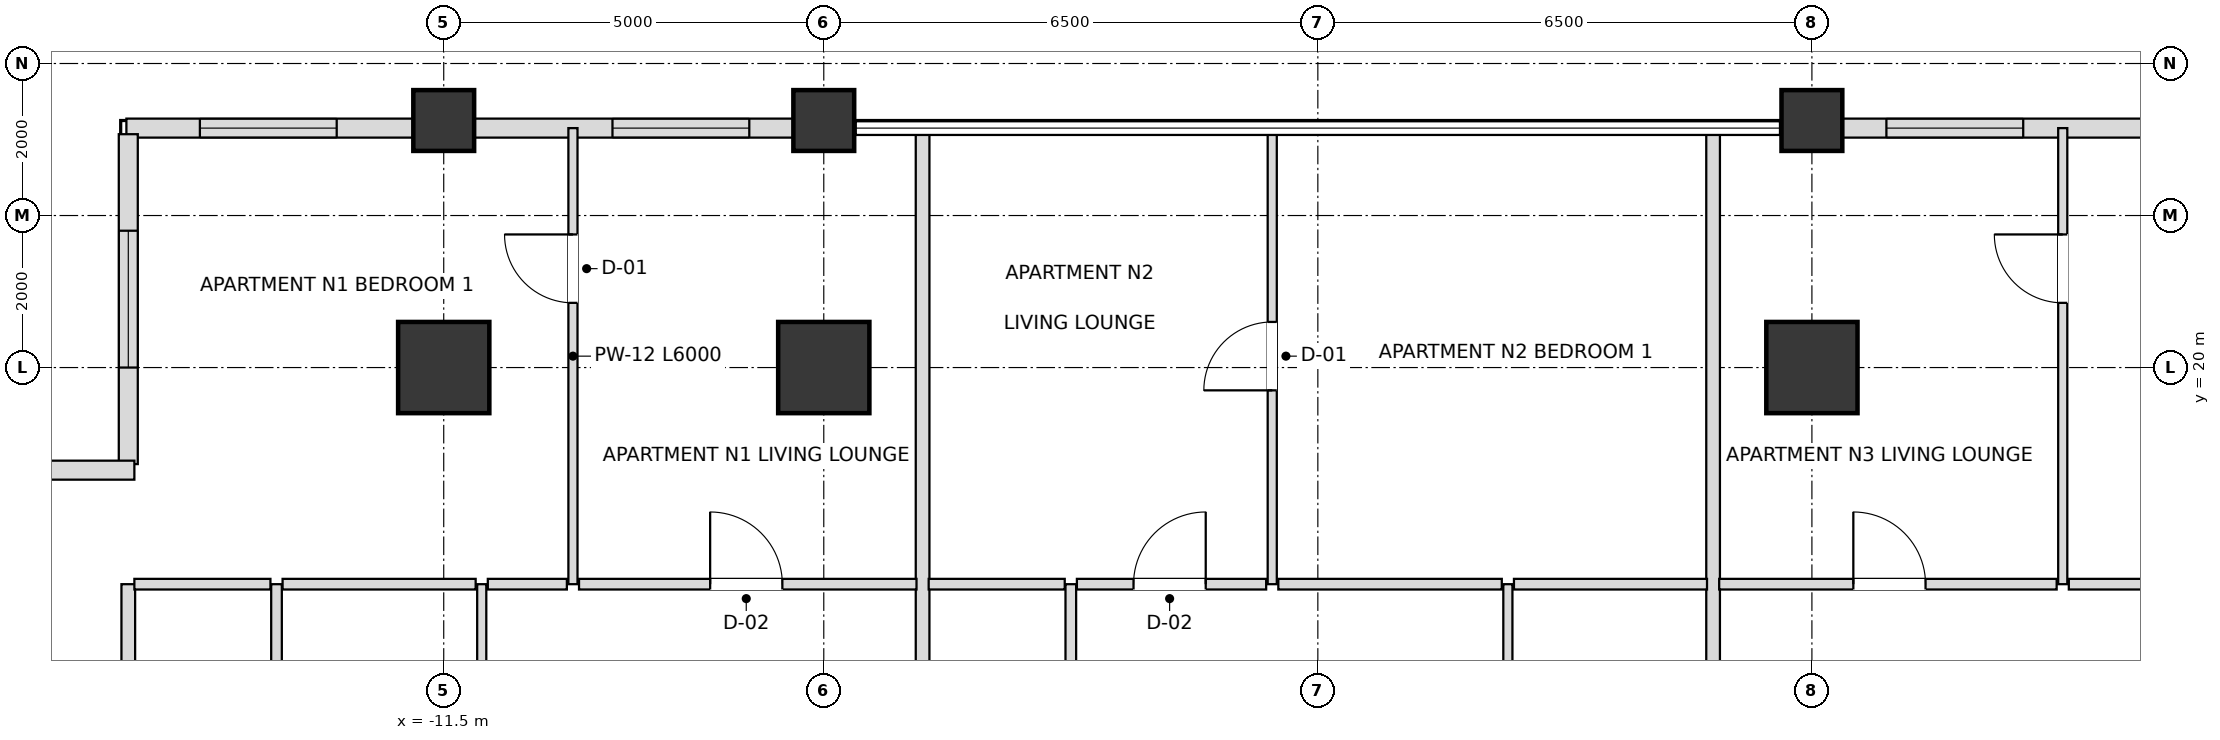
"""IFC4 building model, lengths in metres.
Left out: names, types, materials, properties, quantities, classifications, styles, units other than length and angle.
Written with IfcOpenShell. Run it as: python <this file> out.ifc"""

import sys

from ifc_helpers import new_model, si_unit, direction, frame, frame_2d, origin, origin_2d, place, context, subcontext, project, spatial, rectangle, extrude, element, fill, save


model = new_model("IFC4")
c1 = context("Model", 3, precision=1e-05, world=origin(), true_north=direction((0.0, 1.0)))
c2 = subcontext(c1, "Body", "Model", "MODEL_VIEW")
j1 = project(units=[si_unit("LENGTHUNIT", "METRE"), si_unit("PLANEANGLEUNIT", "RADIAN")], contexts=[c1])
p1 = place(None, origin())
s1 = spatial("IfcSite", under=j1, at=p1, CompositionType="ELEMENT")
p2 = place(p1, origin())
s2 = spatial("IfcBuilding", under=s1, at=p2, CompositionType="ELEMENT")
p3 = place(p2, frame((0.0, 0.0, 113.4)))
s3 = spatial("IfcBuildingStorey", under=s2, at=p3, CompositionType="ELEMENT", Elevation=113.4)
for number, where, z_axis, x_axis in (
    (1, (6.5, 20.0, 0.0), (0.0, 0.0, 1.0), (1.0, 0.0, 0.0)),
    (2, (-6.5, 20.0, 0.0), (0.0, 0.0, 1.0), (1.0, 0.0, 0.0)),
    (3, (-11.5, 20.0, 0.0), (0.0, 0.0, 1.0), (1.0, 0.0, 0.0)),
):
    element("IfcColumn", number, at=place(p3, frame(where, z_axis=z_axis, x_axis=x_axis)), inside=s3, PredefinedType="USERDEFINED", context=c2, shape_type="SweptSolid", body=[
        extrude(rectangle(XDim=1.2, YDim=1.2, at=origin_2d()), origin(), (0.0, 0.0, 1.0), 3.6),
    ])
for number, where, z_axis, x_axis in (
    (4, (-11.5, 23.25, 0.0), (0.0, 0.0, 1.0), (1.0, 0.0, 0.0)),
    (5, (-6.5, 23.25, 0.0), (0.0, 0.0, 1.0), (1.0, 0.0, 0.0)),
    (6, (6.5, 23.25, 0.0), (0.0, 0.0, 1.0), (1.0, 0.0, 0.0)),
):
    element("IfcColumn", number, at=place(p3, frame(where, z_axis=z_axis, x_axis=x_axis)), inside=s3, PredefinedType="COLUMN", context=c2, shape_type="SweptSolid", body=[
        extrude(rectangle(XDim=0.8, YDim=0.8, at=origin_2d()), origin(), (0.0, 0.0, 1.0), 3.6),
    ])
p4 = place(p3, frame((11.105, 23.15, 0.0), z_axis=(0.0, 0.0, 1.0), x_axis=(-1.0, 0.0, 0.0)))
e7 = element("IfcWall", 7, at=p4, inside=s3, PredefinedType="SOLIDWALL", context=c2, shape_type="SweptSolid", body=[
    extrude(rectangle(XDim=4.21, YDim=0.25, at=frame_2d((2.105, 0.0))), origin(), (0.0, 0.0, 1.0), 2.736),
])
p5 = place(p4, frame((1.825, 0.0, 0.72)))
e8 = element("IfcOpeningElement", 8, at=p5, cuts=e7, PredefinedType="OPENING", context=c2, shape_type="SweptSolid", body=[
    extrude(rectangle(XDim=1.8, YDim=1.68, at=frame_2d((0.9, 0.84))), frame((0.0, 0.135, 0.0), z_axis=(0.0, -1.0, 0.0), x_axis=(1.0, 0.0, 0.0)), (0.0, 0.0, 1.0), 0.27),
])
p6 = place(p3, frame((-6.895, 23.15, 0.0), z_axis=(0.0, 0.0, 1.0), x_axis=(-1.0, 0.0, 0.0)))
e9 = element("IfcWall", 9, at=p6, inside=s3, PredefinedType="SOLIDWALL", context=c2, shape_type="SweptSolid", body=[
    extrude(rectangle(XDim=4.21, YDim=0.25, at=frame_2d((2.105, 0.0))), origin(), (0.0, 0.0, 1.0), 2.736),
])
p7 = place(p6, frame((0.585, 0.0, 0.72)))
e10 = element("IfcOpeningElement", 10, at=p7, cuts=e9, PredefinedType="OPENING", context=c2, shape_type="SweptSolid", body=[
    extrude(rectangle(XDim=1.8, YDim=1.68, at=frame_2d((0.9, 0.84))), frame((0.0, 0.135, 0.0), z_axis=(0.0, -1.0, 0.0), x_axis=(1.0, 0.0, 0.0)), (0.0, 0.0, 1.0), 0.27),
])
p8 = place(p3, frame((-11.895, 23.15, 0.0), z_axis=(0.0, 0.0, 1.0), x_axis=(-1.0, 0.0, 0.0)))
e11 = element("IfcWall", 11, at=p8, inside=s3, PredefinedType="SOLIDWALL", context=c2, shape_type="SweptSolid", body=[
    extrude(rectangle(XDim=3.78, YDim=0.25, at=frame_2d((1.89, 0.0))), origin(), (0.0, 0.0, 1.0), 2.736),
])
p9 = place(p8, frame((1.013, 0.0, 0.72)))
e12 = element("IfcOpeningElement", 12, at=p9, cuts=e11, PredefinedType="OPENING", context=c2, shape_type="SweptSolid", body=[
    extrude(rectangle(XDim=1.8, YDim=1.68, at=frame_2d((0.9, 0.84))), frame((0.0, 0.135, 0.0), z_axis=(0.0, -1.0, 0.0), x_axis=(1.0, 0.0, 0.0)), (0.0, 0.0, 1.0), 0.27),
])
p10 = place(p3, frame((-15.65, 23.07, 0.0), z_axis=(0.0, 0.0, 1.0), x_axis=(0.0, -1.0, 0.0)))
e13 = element("IfcWall", 13, at=p10, inside=s3, PredefinedType="SOLIDWALL", context=c2, shape_type="SweptSolid", body=[
    extrude(rectangle(XDim=4.34, YDim=0.25, at=frame_2d((2.17, 0.0))), origin(), (0.0, 0.0, 1.0), 2.736),
])
p11 = place(p10, frame((1.27, 0.0, 0.72)))
e14 = element("IfcOpeningElement", 14, at=p11, cuts=e13, PredefinedType="OPENING", context=c2, shape_type="SweptSolid", body=[
    extrude(rectangle(XDim=1.8, YDim=1.68, at=frame_2d((0.9, 0.84))), frame((0.0, 0.135, 0.0), z_axis=(0.0, -1.0, 0.0), x_axis=(1.0, 0.0, 0.0)), (0.0, 0.0, 1.0), 0.27),
])
p12 = place(p3, frame((-15.57, 18.65, 0.0), z_axis=(0.0, 0.0, 1.0), x_axis=(-1.0, 0.0, 0.0)))
e15 = element("IfcWall", 15, at=p12, inside=s3, PredefinedType="SOLIDWALL", context=c2, shape_type="SweptSolid", body=[
    extrude(rectangle(XDim=4.66, YDim=0.25, at=frame_2d((2.33, 0.0))), origin(), (0.0, 0.0, 1.0), 2.736),
])
p13 = place(p12, frame((1.43, 0.0, 0.72)))
e16 = element("IfcOpeningElement", 16, at=p13, cuts=e15, PredefinedType="OPENING", context=c2, shape_type="SweptSolid", body=[
    extrude(rectangle(XDim=1.8, YDim=1.68, at=frame_2d((0.9, 0.84))), frame((0.0, 0.135, 0.0), z_axis=(0.0, -1.0, 0.0), x_axis=(1.0, 0.0, 0.0)), (0.0, 0.0, 1.0), 0.27),
])
p14 = place(p3, frame((-15.65, 9.3, 0.0), z_axis=(0.0, 0.0, 1.0), x_axis=(0.0, 1.0, 0.0)))
e17 = element("IfcWall", 17, at=p14, inside=s3, PredefinedType="PARTITIONING", context=c2, shape_type="SweptSolid", body=[
    extrude(rectangle(XDim=7.85, YDim=0.18, at=frame_2d((3.925, 0.0))), origin(), (0.0, 0.0, 1.0), 2.736),
])
p15 = place(p3, frame((-13.7, 9.3, 0.0), z_axis=(0.0, 0.0, 1.0), x_axis=(0.0, 1.0, 0.0)))
e18 = element("IfcWall", 18, at=p15, inside=s3, PredefinedType="PARTITIONING", context=c2, shape_type="SweptSolid", body=[
    extrude(rectangle(XDim=7.85, YDim=0.14, at=frame_2d((3.925, 0.0))), origin(), (0.0, 0.0, 1.0), 2.736),
])
p16 = place(p15, frame((3.47, 0.0, 0.0)))
e19 = element("IfcOpeningElement", 19, at=p16, cuts=e18, PredefinedType="OPENING", context=c2, shape_type="SweptSolid", body=[
    extrude(rectangle(XDim=0.9, YDim=2.1, at=frame_2d((0.45, 1.05))), frame((0.0, 0.08, 0.0), z_axis=(0.0, -1.0, 0.0), x_axis=(1.0, 0.0, 0.0)), (0.0, 0.0, 1.0), 0.16),
])
p17 = place(p3, frame((-11.0, 9.3, 0.0), z_axis=(0.0, 0.0, 1.0), x_axis=(0.0, 1.0, 0.0)))
e20 = element("IfcWall", 20, at=p17, inside=s3, PredefinedType="PARTITIONING", context=c2, shape_type="SweptSolid", body=[
    extrude(rectangle(XDim=7.85, YDim=0.12, at=frame_2d((3.925, 0.0))), origin(), (0.0, 0.0, 1.0), 2.816),
])
p18 = place(p17, frame((4.219, 0.0, 0.0)))
e21 = element("IfcOpeningElement", 21, at=p18, cuts=e20, PredefinedType="OPENING", context=c2, shape_type="SweptSolid", body=[
    extrude(rectangle(XDim=0.95, YDim=2.1, at=frame_2d((0.475, 1.05))), frame((0.0, 0.07, 0.0), z_axis=(0.0, -1.0, 0.0), x_axis=(1.0, 0.0, 0.0)), (0.0, 0.0, 1.0), 0.14),
])
p19 = place(p3, frame((-9.8, 17.15, 0.0), z_axis=(0.0, 0.0, 1.0), x_axis=(0.0, 1.0, 0.0)))
e22 = element("IfcWall", 22, at=p19, inside=s3, PredefinedType="PARTITIONING", context=c2, shape_type="SweptSolid", body=[
    extrude(rectangle(XDim=6.0, YDim=0.12, at=frame_2d((3.0, 0.0))), origin(), (0.0, 0.0, 1.0), 2.816),
])
p20 = place(p19, frame((3.701, 0.0, 0.0)))
e23 = element("IfcOpeningElement", 23, at=p20, cuts=e22, PredefinedType="OPENING", context=c2, shape_type="SweptSolid", body=[
    extrude(rectangle(XDim=0.9, YDim=2.1, at=frame_2d((0.45, 1.05))), frame((0.0, 0.07, 0.0), z_axis=(0.0, -1.0, 0.0), x_axis=(1.0, 0.0, 0.0)), (0.0, 0.0, 1.0), 0.14),
])
p21 = place(p3, frame((-5.2, 9.3, 0.0), z_axis=(0.0, 0.0, 1.0), x_axis=(0.0, 1.0, 0.0)))
e24 = element("IfcWall", 24, at=p21, inside=s3, PredefinedType="PARTITIONING", context=c2, shape_type="SweptSolid", body=[
    extrude(rectangle(XDim=13.85, YDim=0.18, at=frame_2d((6.925, 0.0))), origin(), (0.0, 0.0, 1.0), 2.816),
])
p22 = place(p3, frame((-3.25, 9.3, 0.0), z_axis=(0.0, 0.0, 1.0), x_axis=(0.0, 1.0, 0.0)))
e25 = element("IfcWall", 25, at=p22, inside=s3, PredefinedType="PARTITIONING", context=c2, shape_type="SweptSolid", body=[
    extrude(rectangle(XDim=7.85, YDim=0.14, at=frame_2d((3.925, 0.0))), origin(), (0.0, 0.0, 1.0), 3.38),
])
p23 = place(p22, frame((3.47, 0.0, 0.0)))
e26 = element("IfcOpeningElement", 26, at=p23, cuts=e25, PredefinedType="OPENING", context=c2, shape_type="SweptSolid", body=[
    extrude(rectangle(XDim=0.9, YDim=2.1, at=frame_2d((0.45, 1.05))), frame((0.0, 0.08, 0.0), z_axis=(0.0, -1.0, 0.0), x_axis=(1.0, 0.0, 0.0)), (0.0, 0.0, 1.0), 0.16),
])
p24 = place(p3, frame((-0.6, 17.15, 0.0), z_axis=(0.0, 0.0, 1.0), x_axis=(0.0, 1.0, 0.0)))
e27 = element("IfcWall", 27, at=p24, inside=s3, PredefinedType="PARTITIONING", context=c2, shape_type="SweptSolid", body=[
    extrude(rectangle(XDim=6.0, YDim=0.12, at=frame_2d((3.0, 0.0))), origin(), (0.0, 0.0, 1.0), 2.816),
])
p25 = place(p24, frame((2.55, 0.0, 0.0)))
e28 = element("IfcOpeningElement", 28, at=p25, cuts=e27, PredefinedType="OPENING", context=c2, shape_type="SweptSolid", body=[
    extrude(rectangle(XDim=0.9, YDim=2.1, at=frame_2d((0.45, 1.05))), frame((0.0, 0.07, 0.0), z_axis=(0.0, -1.0, 0.0), x_axis=(1.0, 0.0, 0.0)), (0.0, 0.0, 1.0), 0.14),
])
p26 = place(p3, frame((2.5, 9.3, 0.0), z_axis=(0.0, 0.0, 1.0), x_axis=(0.0, 1.0, 0.0)))
e29 = element("IfcWall", 29, at=p26, inside=s3, PredefinedType="PARTITIONING", context=c2, shape_type="SweptSolid", body=[
    extrude(rectangle(XDim=7.85, YDim=0.12, at=frame_2d((3.925, 0.0))), origin(), (0.0, 0.0, 1.0), 3.38),
])
p27 = place(p26, frame((3.445, 0.0, 0.0)))
e30 = element("IfcOpeningElement", 30, at=p27, cuts=e29, PredefinedType="OPENING", context=c2, shape_type="SweptSolid", body=[
    extrude(rectangle(XDim=0.95, YDim=2.1, at=frame_2d((0.475, 1.05))), frame((0.0, 0.07, 0.0), z_axis=(0.0, -1.0, 0.0), x_axis=(1.0, 0.0, 0.0)), (0.0, 0.0, 1.0), 0.14),
])
p28 = place(p3, frame((5.2, 9.3, 0.0), z_axis=(0.0, 0.0, 1.0), x_axis=(0.0, 1.0, 0.0)))
e31 = element("IfcWall", 31, at=p28, inside=s3, PredefinedType="PARTITIONING", context=c2, shape_type="SweptSolid", body=[
    extrude(rectangle(XDim=13.85, YDim=0.18, at=frame_2d((6.925, 0.0))), origin(), (0.0, 0.0, 1.0), 2.816),
])
p29 = place(p3, frame((9.8, 17.15, 0.0), z_axis=(0.0, 0.0, 1.0), x_axis=(0.0, 1.0, 0.0)))
e32 = element("IfcWall", 32, at=p29, inside=s3, PredefinedType="PARTITIONING", context=c2, shape_type="SweptSolid", body=[
    extrude(rectangle(XDim=6.0, YDim=0.12, at=frame_2d((3.0, 0.0))), origin(), (0.0, 0.0, 1.0), 2.816),
])
p30 = place(p29, frame((3.701, 0.0, 0.0)))
e33 = element("IfcOpeningElement", 33, at=p30, cuts=e32, PredefinedType="OPENING", context=c2, shape_type="SweptSolid", body=[
    extrude(rectangle(XDim=0.9, YDim=2.1, at=frame_2d((0.45, 1.05))), frame((0.0, 0.07, 0.0), z_axis=(0.0, -1.0, 0.0), x_axis=(1.0, 0.0, 0.0)), (0.0, 0.0, 1.0), 0.14),
])
p31 = place(p3, frame((-15.57, 17.15, 0.0), z_axis=(0.0, 0.0, 1.0), x_axis=(1.0, 0.0, 0.0)))
e34 = element("IfcWall", 34, at=p31, inside=s3, PredefinedType="PARTITIONING", context=c2, shape_type="SweptSolid", body=[
    extrude(rectangle(XDim=1.79, YDim=0.14, at=frame_2d((0.895, 0.0))), origin(), (0.0, 0.0, 1.0), 2.736),
])
p32 = place(p3, frame((-13.62, 17.15, 0.0), z_axis=(0.0, 0.0, 1.0), x_axis=(1.0, 0.0, 0.0)))
e35 = element("IfcWall", 35, at=p32, inside=s3, PredefinedType="PARTITIONING", context=c2, shape_type="SweptSolid", body=[
    extrude(rectangle(XDim=2.54, YDim=0.14, at=frame_2d((1.27, 0.0))), origin(), (0.0, 0.0, 1.0), 2.736),
])
p33 = place(p3, frame((-10.92, 17.15, 0.0), z_axis=(0.0, 0.0, 1.0), x_axis=(1.0, 0.0, 0.0)))
e36 = element("IfcWall", 36, at=p33, inside=s3, PredefinedType="PARTITIONING", context=c2, shape_type="SweptSolid", body=[
    extrude(rectangle(XDim=1.04, YDim=0.14, at=frame_2d((0.52, 0.0))), origin(), (0.0, 0.0, 1.0), 3.38),
])
p34 = place(p3, frame((-9.72, 17.15, 0.0), z_axis=(0.0, 0.0, 1.0), x_axis=(1.0, 0.0, 0.0)))
e37 = element("IfcWall", 37, at=p34, inside=s3, PredefinedType="PARTITIONING", context=c2, shape_type="SweptSolid", body=[
    extrude(rectangle(XDim=4.44, YDim=0.14, at=frame_2d((2.22, 0.0))), origin(), (0.0, 0.0, 1.0), 2.816),
])
p35 = place(p34, frame((1.725, 0.0, 0.0)))
e38 = element("IfcOpeningElement", 38, at=p35, cuts=e37, PredefinedType="OPENING", context=c2, shape_type="SweptSolid", body=[
    extrude(rectangle(XDim=0.95, YDim=2.1, at=frame_2d((0.475, 1.05))), frame((0.0, 0.08, 0.0), z_axis=(0.0, -1.0, 0.0), x_axis=(1.0, 0.0, 0.0)), (0.0, 0.0, 1.0), 0.16),
])
p36 = place(p3, frame((-5.12, 17.15, 0.0), z_axis=(0.0, 0.0, 1.0), x_axis=(1.0, 0.0, 0.0)))
e39 = element("IfcWall", 39, at=p36, inside=s3, PredefinedType="PARTITIONING", context=c2, shape_type="SweptSolid", body=[
    extrude(rectangle(XDim=1.79, YDim=0.14, at=frame_2d((0.895, 0.0))), origin(), (0.0, 0.0, 1.0), 3.38),
])
p37 = place(p3, frame((-3.17, 17.15, 0.0), z_axis=(0.0, 0.0, 1.0), x_axis=(1.0, 0.0, 0.0)))
e40 = element("IfcWall", 40, at=p37, inside=s3, PredefinedType="PARTITIONING", context=c2, shape_type="SweptSolid", body=[
    extrude(rectangle(XDim=2.49, YDim=0.14, at=frame_2d((1.245, 0.0))), origin(), (0.0, 0.0, 1.0), 3.38),
])
p38 = place(p37, frame((0.745, 0.0, 0.0)))
e41 = element("IfcOpeningElement", 41, at=p38, cuts=e40, PredefinedType="OPENING", context=c2, shape_type="SweptSolid", body=[
    extrude(rectangle(XDim=0.95, YDim=2.1, at=frame_2d((0.475, 1.05))), frame((0.0, 0.08, 0.0), z_axis=(0.0, -1.0, 0.0), x_axis=(1.0, 0.0, 0.0)), (0.0, 0.0, 1.0), 0.16),
])
p39 = place(p3, frame((-0.52, 17.15, 0.0), z_axis=(0.0, 0.0, 1.0), x_axis=(1.0, 0.0, 0.0)))
e42 = element("IfcWall", 42, at=p39, inside=s3, PredefinedType="PARTITIONING", context=c2, shape_type="SweptSolid", body=[
    extrude(rectangle(XDim=2.94, YDim=0.14, at=frame_2d((1.47, 0.0))), origin(), (0.0, 0.0, 1.0), 3.38),
])
p40 = place(p3, frame((2.58, 17.15, 0.0), z_axis=(0.0, 0.0, 1.0), x_axis=(1.0, 0.0, 0.0)))
e43 = element("IfcWall", 43, at=p40, inside=s3, PredefinedType="PARTITIONING", context=c2, shape_type="SweptSolid", body=[
    extrude(rectangle(XDim=2.54, YDim=0.14, at=frame_2d((1.27, 0.0))), origin(), (0.0, 0.0, 1.0), 3.38),
])
p41 = place(p3, frame((5.28, 17.15, 0.0), z_axis=(0.0, 0.0, 1.0), x_axis=(1.0, 0.0, 0.0)))
e44 = element("IfcWall", 44, at=p41, inside=s3, PredefinedType="PARTITIONING", context=c2, shape_type="SweptSolid", body=[
    extrude(rectangle(XDim=4.44, YDim=0.14, at=frame_2d((2.22, 0.0))), origin(), (0.0, 0.0, 1.0), 2.816),
])
p42 = place(p41, frame((1.765, 0.0, 0.0)))
e45 = element("IfcOpeningElement", 45, at=p42, cuts=e44, PredefinedType="OPENING", context=c2, shape_type="SweptSolid", body=[
    extrude(rectangle(XDim=0.95, YDim=2.1, at=frame_2d((0.475, 1.05))), frame((0.0, 0.08, 0.0), z_axis=(0.0, -1.0, 0.0), x_axis=(1.0, 0.0, 0.0)), (0.0, 0.0, 1.0), 0.16),
])
p43 = place(p3, frame((9.88, 17.15, 0.0), z_axis=(0.0, 0.0, 1.0), x_axis=(1.0, 0.0, 0.0)))
e46 = element("IfcWall", 46, at=p43, inside=s3, PredefinedType="PARTITIONING", context=c2, shape_type="SweptSolid", body=[
    extrude(rectangle(XDim=1.04, YDim=0.14, at=frame_2d((0.52, 0.0))), origin(), (0.0, 0.0, 1.0), 3.38),
])
p44 = place(p5, origin())
e47 = element("IfcWindow", 47, at=p44, inside=s3, PartitioningType="SINGLE_PANEL", PredefinedType="WINDOW", context=c2, shape_type="SweptSolid", body=[
    extrude(rectangle(XDim=1.8, YDim=1.68, at=frame_2d((0.9, 0.84))), frame((0.0, 0.03, 0.0), z_axis=(0.0, -1.0, 0.0), x_axis=(1.0, 0.0, 0.0)), (0.0, 0.0, 1.0), 0.06),
])
fill(e8, e47)
p45 = place(p7, origin())
e48 = element("IfcWindow", 48, at=p45, inside=s3, PartitioningType="SINGLE_PANEL", PredefinedType="WINDOW", context=c2, shape_type="SweptSolid", body=[
    extrude(rectangle(XDim=1.8, YDim=1.68, at=frame_2d((0.9, 0.84))), frame((0.0, 0.03, 0.0), z_axis=(0.0, -1.0, 0.0), x_axis=(1.0, 0.0, 0.0)), (0.0, 0.0, 1.0), 0.06),
])
fill(e10, e48)
p46 = place(p9, origin())
e49 = element("IfcWindow", 49, at=p46, inside=s3, PartitioningType="SINGLE_PANEL", PredefinedType="WINDOW", context=c2, shape_type="SweptSolid", body=[
    extrude(rectangle(XDim=1.8, YDim=1.68, at=frame_2d((0.9, 0.84))), frame((0.0, 0.03, 0.0), z_axis=(0.0, -1.0, 0.0), x_axis=(1.0, 0.0, 0.0)), (0.0, 0.0, 1.0), 0.06),
])
fill(e12, e49)
p47 = place(p11, origin())
e50 = element("IfcWindow", 50, at=p47, inside=s3, PartitioningType="SINGLE_PANEL", PredefinedType="WINDOW", context=c2, shape_type="SweptSolid", body=[
    extrude(rectangle(XDim=1.8, YDim=1.68, at=frame_2d((0.9, 0.84))), frame((0.0, 0.03, 0.0), z_axis=(0.0, -1.0, 0.0), x_axis=(1.0, 0.0, 0.0)), (0.0, 0.0, 1.0), 0.06),
])
fill(e14, e50)
p48 = place(p35, origin())
e51 = element("IfcDoor", 51, at=p48, inside=s3, OperationType="SINGLE_SWING_LEFT", PredefinedType="DOOR", context=c2, shape_type="SweptSolid", body=[
    extrude(rectangle(XDim=0.95, YDim=2.1, at=frame_2d((0.475, 1.05))), frame((0.0, 0.025, 0.0), z_axis=(0.0, -1.0, 0.0), x_axis=(1.0, 0.0, 0.0)), (0.0, 0.0, 1.0), 0.05),
])
fill(e38, e51)
p49 = place(p20, origin())
e52 = element("IfcDoor", 52, at=p49, inside=s3, OperationType="SINGLE_SWING_RIGHT", PredefinedType="DOOR", context=c2, shape_type="SweptSolid", body=[
    extrude(rectangle(XDim=0.9, YDim=2.1, at=frame_2d((0.45, 1.05))), frame((0.0, 0.025, 0.0), z_axis=(0.0, -1.0, 0.0), x_axis=(1.0, 0.0, 0.0)), (0.0, 0.0, 1.0), 0.05),
])
fill(e23, e52)
p50 = place(p38, origin())
e53 = element("IfcDoor", 53, at=p50, inside=s3, OperationType="SINGLE_SWING_RIGHT", PredefinedType="DOOR", context=c2, shape_type="SweptSolid", body=[
    extrude(rectangle(XDim=0.95, YDim=2.1, at=frame_2d((0.475, 1.05))), frame((0.0, 0.025, 0.0), z_axis=(0.0, -1.0, 0.0), x_axis=(1.0, 0.0, 0.0)), (0.0, 0.0, 1.0), 0.05),
])
fill(e41, e53)
p51 = place(p25, origin())
e54 = element("IfcDoor", 54, at=p51, inside=s3, OperationType="SINGLE_SWING_LEFT", PredefinedType="DOOR", context=c2, shape_type="SweptSolid", body=[
    extrude(rectangle(XDim=0.9, YDim=2.1, at=frame_2d((0.45, 1.05))), frame((0.0, 0.025, 0.0), z_axis=(0.0, -1.0, 0.0), x_axis=(1.0, 0.0, 0.0)), (0.0, 0.0, 1.0), 0.05),
])
fill(e28, e54)
p52 = place(p42, origin())
e55 = element("IfcDoor", 55, at=p52, inside=s3, OperationType="SINGLE_SWING_LEFT", PredefinedType="DOOR", context=c2, shape_type="SweptSolid", body=[
    extrude(rectangle(XDim=0.95, YDim=2.1, at=frame_2d((0.475, 1.05))), frame((0.0, 0.025, 0.0), z_axis=(0.0, -1.0, 0.0), x_axis=(1.0, 0.0, 0.0)), (0.0, 0.0, 1.0), 0.05),
])
fill(e45, e55)
p53 = place(p30, origin())
e56 = element("IfcDoor", 56, at=p53, inside=s3, OperationType="SINGLE_SWING_RIGHT", PredefinedType="DOOR", context=c2, shape_type="SweptSolid", body=[
    extrude(rectangle(XDim=0.9, YDim=2.1, at=frame_2d((0.45, 1.05))), frame((0.0, 0.025, 0.0), z_axis=(0.0, -1.0, 0.0), x_axis=(1.0, 0.0, 0.0)), (0.0, 0.0, 1.0), 0.05),
])
fill(e33, e56)
save(model, sys.argv[1])
